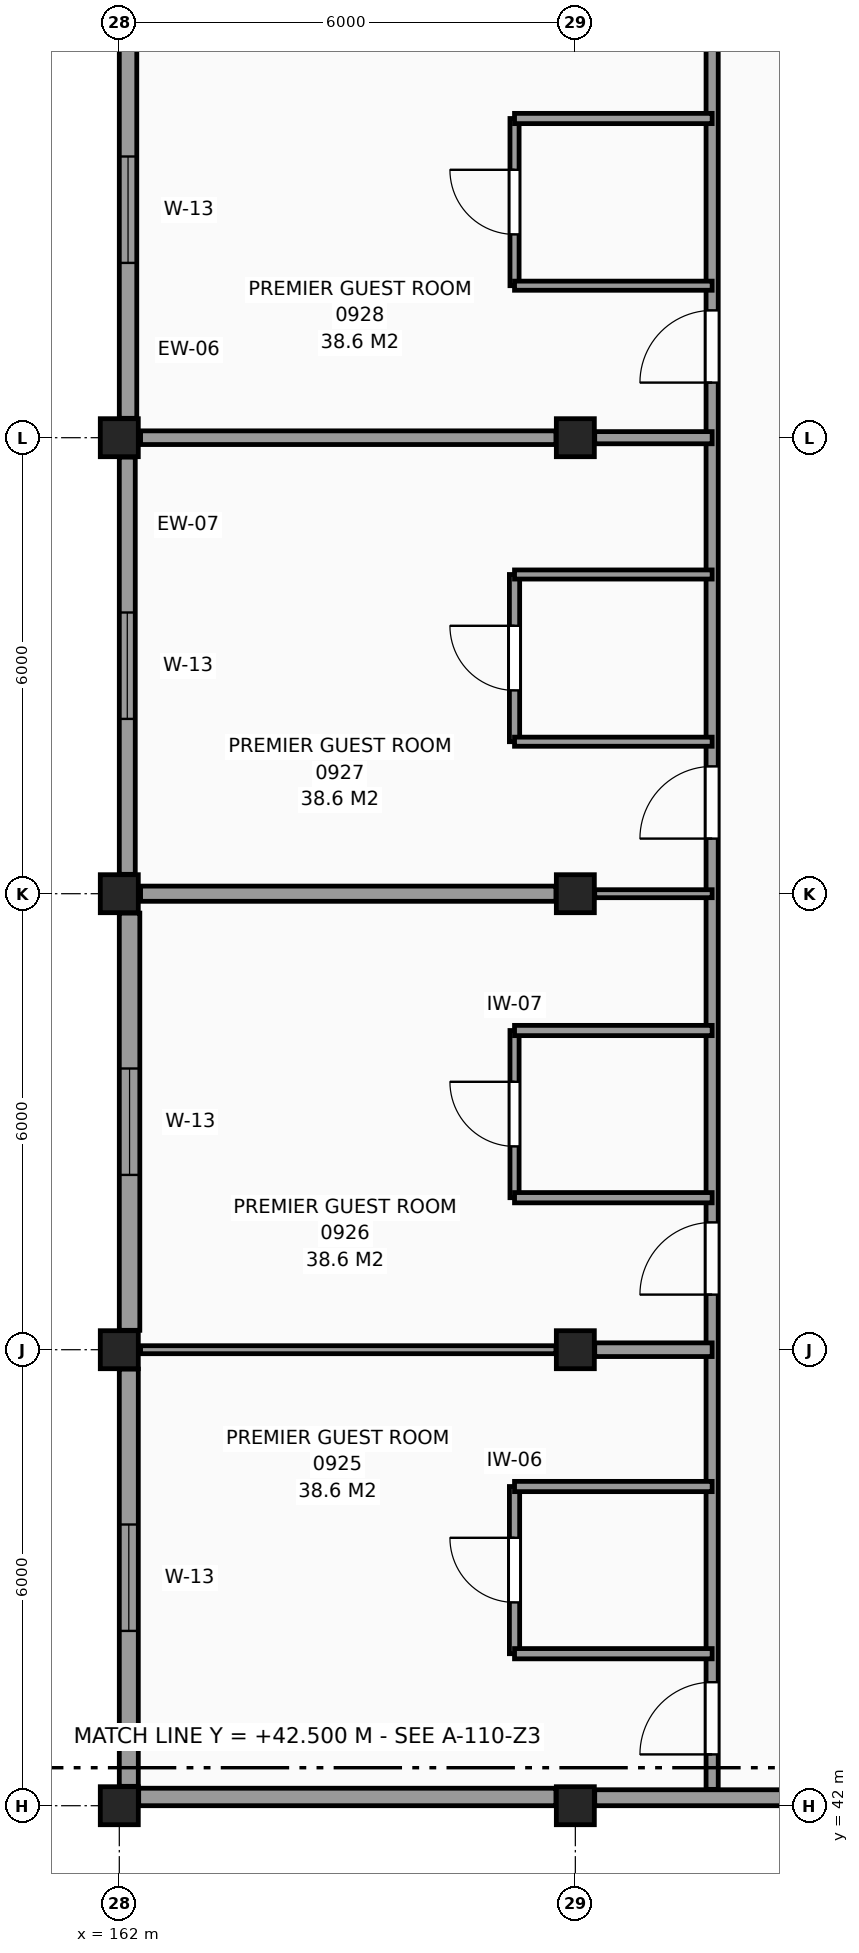
"""IFC4 building model, lengths in metres.
Left out: names, types, materials, properties, quantities, classifications, styles, units other than length and angle.
Written with IfcOpenShell. Run it as: python <this file> out.ifc"""

import sys

from ifc_helpers import new_model, si_unit, direction, frame, frame_2d, origin, origin_2d, place, context, subcontext, project, spatial, rectangle, extrude, element, fill, save


model = new_model("IFC4")
c1 = context("Model", 3, precision=1e-05, world=origin(), true_north=direction((0.0, 1.0)))
c2 = subcontext(c1, "Body", "Model", "MODEL_VIEW")
j1 = project(units=[si_unit("LENGTHUNIT", "METRE"), si_unit("PLANEANGLEUNIT", "RADIAN")], contexts=[c1])
p1 = place(None, origin())
s1 = spatial("IfcSite", under=j1, at=p1, CompositionType="ELEMENT")
p2 = place(p1, origin())
s2 = spatial("IfcBuilding", under=s1, at=p2, CompositionType="ELEMENT")
p3 = place(p2, frame((0.0, 0.0, 38.1)))
s3 = spatial("IfcBuildingStorey", under=s2, at=p3, CompositionType="ELEMENT", Elevation=38.1)
for number, where, z_axis, x_axis in (
    (1, (162.0, 42.0, 0.0), (0.0, 0.0, 1.0), (1.0, 0.0, 0.0)),
    (2, (162.0, 48.0, 0.0), (0.0, 0.0, 1.0), (1.0, 0.0, 0.0)),
    (3, (162.0, 54.0, 0.0), (0.0, 0.0, 1.0), (1.0, 0.0, 0.0)),
    (4, (162.0, 60.0, 0.0), (0.0, 0.0, 1.0), (1.0, 0.0, 0.0)),
    (5, (168.0, 42.0, 0.0), (0.0, 0.0, 1.0), (1.0, 0.0, 0.0)),
    (6, (168.0, 48.0, 0.0), (0.0, 0.0, 1.0), (1.0, 0.0, 0.0)),
    (7, (168.0, 54.0, 0.0), (0.0, 0.0, 1.0), (1.0, 0.0, 0.0)),
    (8, (168.0, 60.0, 0.0), (0.0, 0.0, 1.0), (1.0, 0.0, 0.0)),
):
    element("IfcColumn", number, at=place(p3, frame(where, z_axis=z_axis, x_axis=x_axis)), inside=s3, PredefinedType="COLUMN", context=c2, shape_type="SweptSolid", body=[
        extrude(rectangle(XDim=0.5, YDim=0.5, at=origin_2d()), origin(), (0.0, 0.0, 1.0), 3.3),
    ])
p4 = place(p3, frame((162.115, 65.745, 0.0), z_axis=(0.0, 0.0, 1.0), x_axis=(0.0, -1.0, 0.0)))
e9 = element("IfcWall", 9, at=p4, inside=s3, PredefinedType="SOLIDWALL", context=c2, shape_type="SweptSolid", body=[
    extrude(rectangle(XDim=5.49, YDim=0.23, at=frame_2d((2.745, 0.0))), origin(), (0.0, 0.0, 1.0), 2.41),
])
p5 = place(p4, frame((2.045, 0.0, 0.8)))
e10 = element("IfcOpeningElement", 10, at=p5, cuts=e9, PredefinedType="OPENING", context=c2, shape_type="SweptSolid", body=[
    extrude(rectangle(XDim=1.4, YDim=1.4, at=frame_2d((0.7, 0.7))), frame((0.0, 0.125, 0.0), z_axis=(0.0, -1.0, 0.0), x_axis=(1.0, 0.0, 0.0)), (0.0, 0.0, 1.0), 0.25),
])
p6 = place(p3, frame((162.105, 59.745, 0.0), z_axis=(0.0, 0.0, 1.0), x_axis=(0.0, -1.0, 0.0)))
e11 = element("IfcWall", 11, at=p6, inside=s3, PredefinedType="SOLIDWALL", context=c2, shape_type="SweptSolid", body=[
    extrude(rectangle(XDim=5.49, YDim=0.21, at=frame_2d((2.745, 0.0))), origin(), (0.0, 0.0, 1.0), 2.41),
])
p7 = place(p6, frame((2.045, 0.0, 0.8)))
e12 = element("IfcOpeningElement", 12, at=p7, cuts=e11, PredefinedType="OPENING", context=c2, shape_type="SweptSolid", body=[
    extrude(rectangle(XDim=1.4, YDim=1.4, at=frame_2d((0.7, 0.7))), frame((0.0, 0.115, 0.0), z_axis=(0.0, -1.0, 0.0), x_axis=(1.0, 0.0, 0.0)), (0.0, 0.0, 1.0), 0.23),
])
p8 = place(p3, frame((162.135, 53.745, 0.0), z_axis=(0.0, 0.0, 1.0), x_axis=(0.0, -1.0, 0.0)))
e13 = element("IfcWall", 13, at=p8, inside=s3, PredefinedType="SOLIDWALL", context=c2, shape_type="SweptSolid", body=[
    extrude(rectangle(XDim=5.49, YDim=0.27, at=frame_2d((2.745, 0.0))), origin(), (0.0, 0.0, 1.0), 2.41),
])
p9 = place(p8, frame((2.045, 0.0, 0.8)))
e14 = element("IfcOpeningElement", 14, at=p9, cuts=e13, PredefinedType="OPENING", context=c2, shape_type="SweptSolid", body=[
    extrude(rectangle(XDim=1.4, YDim=1.4, at=frame_2d((0.7, 0.7))), frame((0.0, 0.145, 0.0), z_axis=(0.0, -1.0, 0.0), x_axis=(1.0, 0.0, 0.0)), (0.0, 0.0, 1.0), 0.29),
])
p10 = place(p3, frame((162.125, 47.745, 0.0), z_axis=(0.0, 0.0, 1.0), x_axis=(0.0, -1.0, 0.0)))
e15 = element("IfcWall", 15, at=p10, inside=s3, PredefinedType="SOLIDWALL", context=c2, shape_type="SweptSolid", body=[
    extrude(rectangle(XDim=5.49, YDim=0.25, at=frame_2d((2.745, 0.0))), origin(), (0.0, 0.0, 1.0), 2.41),
])
p11 = place(p10, frame((2.045, 0.0, 0.8)))
e16 = element("IfcOpeningElement", 16, at=p11, cuts=e15, PredefinedType="OPENING", context=c2, shape_type="SweptSolid", body=[
    extrude(rectangle(XDim=1.4, YDim=1.4, at=frame_2d((0.7, 0.7))), frame((0.0, 0.135, 0.0), z_axis=(0.0, -1.0, 0.0), x_axis=(1.0, 0.0, 0.0)), (0.0, 0.0, 1.0), 0.27),
])
p12 = place(p3, frame((162.255, 42.115, 0.0), z_axis=(0.0, 0.0, 1.0), x_axis=(1.0, 0.0, 0.0)))
e17 = element("IfcWall", 17, at=p12, inside=s3, PredefinedType="SOLIDWALL", context=c2, shape_type="SweptSolid", body=[
    extrude(rectangle(XDim=5.49, YDim=0.23, at=frame_2d((2.745, 0.0))), origin(), (0.0, 0.0, 1.0), 2.26),
])
p13 = place(p3, frame((168.255, 42.105, 0.0), z_axis=(0.0, 0.0, 1.0), x_axis=(1.0, 0.0, 0.0)))
e18 = element("IfcWall", 18, at=p13, inside=s3, PredefinedType="SOLIDWALL", context=c2, shape_type="SweptSolid", body=[
    extrude(rectangle(XDim=5.49, YDim=0.21, at=frame_2d((2.745, 0.0))), origin(), (0.0, 0.0, 1.0), 2.26),
])
p14 = place(p3, frame((167.2, 44.0, 0.0), z_axis=(0.0, 0.0, 1.0), x_axis=(0.0, 1.0, 0.0)))
e19 = element("IfcWall", 19, at=p14, inside=s3, PredefinedType="PARTITIONING", context=c2, shape_type="SweptSolid", body=[
    extrude(rectangle(XDim=2.2, YDim=0.135, at=frame_2d((1.1, 0.0))), origin(), (0.0, 0.0, 1.0), 3.06),
])
p15 = place(p14, frame((0.675, 0.0, 0.0)))
e20 = element("IfcOpeningElement", 20, at=p15, cuts=e19, PredefinedType="OPENING", context=c2, shape_type="SweptSolid", body=[
    extrude(rectangle(XDim=0.85, YDim=2.1, at=frame_2d((0.425, 1.05))), frame((0.0, 0.078, 0.0), z_axis=(0.0, -1.0, 0.0), x_axis=(1.0, 0.0, 0.0)), (0.0, 0.0, 1.0), 0.155),
])
p16 = place(p3, frame((167.2, 50.0, 0.0), z_axis=(0.0, 0.0, 1.0), x_axis=(0.0, 1.0, 0.0)))
e21 = element("IfcWall", 21, at=p16, inside=s3, PredefinedType="PARTITIONING", context=c2, shape_type="SweptSolid", body=[
    extrude(rectangle(XDim=2.2, YDim=0.12, at=frame_2d((1.1, 0.0))), origin(), (0.0, 0.0, 1.0), 3.06),
])
p17 = place(p16, frame((0.675, 0.0, 0.0)))
e22 = element("IfcOpeningElement", 22, at=p17, cuts=e21, PredefinedType="OPENING", context=c2, shape_type="SweptSolid", body=[
    extrude(rectangle(XDim=0.85, YDim=2.1, at=frame_2d((0.425, 1.05))), frame((0.0, 0.07, 0.0), z_axis=(0.0, -1.0, 0.0), x_axis=(1.0, 0.0, 0.0)), (0.0, 0.0, 1.0), 0.14),
])
p18 = place(p3, frame((167.2, 56.0, 0.0), z_axis=(0.0, 0.0, 1.0), x_axis=(0.0, 1.0, 0.0)))
e23 = element("IfcWall", 23, at=p18, inside=s3, PredefinedType="PARTITIONING", context=c2, shape_type="SweptSolid", body=[
    extrude(rectangle(XDim=2.2, YDim=0.135, at=frame_2d((1.1, 0.0))), origin(), (0.0, 0.0, 1.0), 3.06),
])
p19 = place(p18, frame((0.675, 0.0, 0.0)))
e24 = element("IfcOpeningElement", 24, at=p19, cuts=e23, PredefinedType="OPENING", context=c2, shape_type="SweptSolid", body=[
    extrude(rectangle(XDim=0.85, YDim=2.1, at=frame_2d((0.425, 1.05))), frame((0.0, 0.078, 0.0), z_axis=(0.0, -1.0, 0.0), x_axis=(1.0, 0.0, 0.0)), (0.0, 0.0, 1.0), 0.155),
])
p20 = place(p3, frame((167.2, 62.0, 0.0), z_axis=(0.0, 0.0, 1.0), x_axis=(0.0, 1.0, 0.0)))
e25 = element("IfcWall", 25, at=p20, inside=s3, PredefinedType="PARTITIONING", context=c2, shape_type="SweptSolid", body=[
    extrude(rectangle(XDim=2.2, YDim=0.12, at=frame_2d((1.1, 0.0))), origin(), (0.0, 0.0, 1.0), 3.06),
])
p21 = place(p20, frame((0.675, 0.0, 0.0)))
e26 = element("IfcOpeningElement", 26, at=p21, cuts=e25, PredefinedType="OPENING", context=c2, shape_type="SweptSolid", body=[
    extrude(rectangle(XDim=0.85, YDim=2.1, at=frame_2d((0.425, 1.05))), frame((0.0, 0.07, 0.0), z_axis=(0.0, -1.0, 0.0), x_axis=(1.0, 0.0, 0.0)), (0.0, 0.0, 1.0), 0.14),
])
p22 = place(p3, frame((169.8, 42.215, 0.0), z_axis=(0.0, 0.0, 1.0), x_axis=(0.0, 1.0, 0.0)))
e27 = element("IfcWall", 27, at=p22, inside=s3, PredefinedType="PARTITIONING", context=c2, shape_type="SweptSolid", body=[
    extrude(rectangle(XDim=65.605, YDim=0.16, at=frame_2d((32.802, 0.0))), origin(), (0.0, 0.0, 1.0), 3.06),
])
p23 = place(p22, frame((50.185, 0.0, 0.0)))
e28 = element("IfcOpeningElement", 28, at=p23, cuts=e27, PredefinedType="OPENING", context=c2, shape_type="SweptSolid", body=[
    extrude(rectangle(XDim=1.2, YDim=2.2, at=frame_2d((0.6, 1.1))), frame((0.0, 0.09, 0.0), z_axis=(0.0, -1.0, 0.0), x_axis=(1.0, 0.0, 0.0)), (0.0, 0.0, 1.0), 0.18),
])
p24 = place(p22, frame((32.285, 0.0, 0.0)))
e29 = element("IfcOpeningElement", 29, at=p24, cuts=e27, PredefinedType="OPENING", context=c2, shape_type="SweptSolid", body=[
    extrude(rectangle(XDim=1.0, YDim=2.15, at=frame_2d((0.5, 1.075))), frame((0.0, 0.09, 0.0), z_axis=(0.0, -1.0, 0.0), x_axis=(1.0, 0.0, 0.0)), (0.0, 0.0, 1.0), 0.18),
])
p25 = place(p22, frame((0.46, 0.0, 0.0)))
e30 = element("IfcOpeningElement", 30, at=p25, cuts=e27, PredefinedType="OPENING", context=c2, shape_type="SweptSolid", body=[
    extrude(rectangle(XDim=0.95, YDim=2.1, at=frame_2d((0.475, 1.05))), frame((0.0, 0.09, 0.0), z_axis=(0.0, -1.0, 0.0), x_axis=(1.0, 0.0, 0.0)), (0.0, 0.0, 1.0), 0.18),
])
p26 = place(p22, frame((6.51, 0.0, 0.0)))
e31 = element("IfcOpeningElement", 31, at=p26, cuts=e27, PredefinedType="OPENING", context=c2, shape_type="SweptSolid", body=[
    extrude(rectangle(XDim=0.95, YDim=2.1, at=frame_2d((0.475, 1.05))), frame((0.0, 0.09, 0.0), z_axis=(0.0, -1.0, 0.0), x_axis=(1.0, 0.0, 0.0)), (0.0, 0.0, 1.0), 0.18),
])
p27 = place(p22, frame((12.51, 0.0, 0.0)))
e32 = element("IfcOpeningElement", 32, at=p27, cuts=e27, PredefinedType="OPENING", context=c2, shape_type="SweptSolid", body=[
    extrude(rectangle(XDim=0.95, YDim=2.1, at=frame_2d((0.475, 1.05))), frame((0.0, 0.09, 0.0), z_axis=(0.0, -1.0, 0.0), x_axis=(1.0, 0.0, 0.0)), (0.0, 0.0, 1.0), 0.18),
])
p28 = place(p22, frame((18.51, 0.0, 0.0)))
e33 = element("IfcOpeningElement", 33, at=p28, cuts=e27, PredefinedType="OPENING", context=c2, shape_type="SweptSolid", body=[
    extrude(rectangle(XDim=0.95, YDim=2.1, at=frame_2d((0.475, 1.05))), frame((0.0, 0.09, 0.0), z_axis=(0.0, -1.0, 0.0), x_axis=(1.0, 0.0, 0.0)), (0.0, 0.0, 1.0), 0.18),
])
p29 = place(p22, frame((24.51, 0.0, 0.0)))
e34 = element("IfcOpeningElement", 34, at=p29, cuts=e27, PredefinedType="OPENING", context=c2, shape_type="SweptSolid", body=[
    extrude(rectangle(XDim=0.95, YDim=2.1, at=frame_2d((0.475, 1.05))), frame((0.0, 0.09, 0.0), z_axis=(0.0, -1.0, 0.0), x_axis=(1.0, 0.0, 0.0)), (0.0, 0.0, 1.0), 0.18),
])
p30 = place(p22, frame((54.51, 0.0, 0.0)))
e35 = element("IfcOpeningElement", 35, at=p30, cuts=e27, PredefinedType="OPENING", context=c2, shape_type="SweptSolid", body=[
    extrude(rectangle(XDim=0.95, YDim=2.1, at=frame_2d((0.475, 1.05))), frame((0.0, 0.09, 0.0), z_axis=(0.0, -1.0, 0.0), x_axis=(1.0, 0.0, 0.0)), (0.0, 0.0, 1.0), 0.18),
])
p31 = place(p22, frame((60.51, 0.0, 0.0)))
e36 = element("IfcOpeningElement", 36, at=p31, cuts=e27, PredefinedType="OPENING", context=c2, shape_type="SweptSolid", body=[
    extrude(rectangle(XDim=0.95, YDim=2.1, at=frame_2d((0.475, 1.05))), frame((0.0, 0.09, 0.0), z_axis=(0.0, -1.0, 0.0), x_axis=(1.0, 0.0, 0.0)), (0.0, 0.0, 1.0), 0.18),
])
for number, where, z_axis, x_axis in (
    (37, (167.2, 44.0, 0.0), (0.0, 0.0, 1.0), (1.0, 0.0, 0.0)),
    (38, (167.2, 46.2, 0.0), (0.0, 0.0, 1.0), (1.0, 0.0, 0.0)),
):
    element("IfcWall", number, at=place(p3, frame(where, z_axis=z_axis, x_axis=x_axis)), inside=s3, PredefinedType="PARTITIONING", context=c2, shape_type="SweptSolid", body=[
        extrude(rectangle(XDim=2.6, YDim=0.135, at=frame_2d((1.3, 0.0))), origin(), (0.0, 0.0, 1.0), 3.06),
    ])
p32 = place(p3, frame((162.28, 48.0, 0.0), z_axis=(0.0, 0.0, 1.0), x_axis=(1.0, 0.0, 0.0)))
e39 = element("IfcWall", 39, at=p32, inside=s3, PredefinedType="PARTITIONING", context=c2, shape_type="SweptSolid", body=[
    extrude(rectangle(XDim=5.465, YDim=0.105, at=frame_2d((2.732, 0.0))), origin(), (0.0, 0.0, 1.0), 2.46),
])
p33 = place(p3, frame((168.255, 48.0, 0.0), z_axis=(0.0, 0.0, 1.0), x_axis=(1.0, 0.0, 0.0)))
e40 = element("IfcWall", 40, at=p33, inside=s3, PredefinedType="PARTITIONING", context=c2, shape_type="SweptSolid", body=[
    extrude(rectangle(XDim=1.545, YDim=0.18, at=frame_2d((0.772, 0.0))), origin(), (0.0, 0.0, 1.0), 2.61),
])
for number, where, z_axis, x_axis in (
    (41, (167.2, 50.0, 0.0), (0.0, 0.0, 1.0), (1.0, 0.0, 0.0)),
    (42, (167.2, 52.2, 0.0), (0.0, 0.0, 1.0), (1.0, 0.0, 0.0)),
):
    element("IfcWall", number, at=place(p3, frame(where, z_axis=z_axis, x_axis=x_axis)), inside=s3, PredefinedType="PARTITIONING", context=c2, shape_type="SweptSolid", body=[
        extrude(rectangle(XDim=2.6, YDim=0.135, at=frame_2d((1.3, 0.0))), origin(), (0.0, 0.0, 1.0), 3.06),
    ])
p34 = place(p3, frame((162.28, 54.0, 0.0), z_axis=(0.0, 0.0, 1.0), x_axis=(1.0, 0.0, 0.0)))
e43 = element("IfcWall", 43, at=p34, inside=s3, PredefinedType="PARTITIONING", context=c2, shape_type="SweptSolid", body=[
    extrude(rectangle(XDim=5.465, YDim=0.2, at=frame_2d((2.732, 0.0))), origin(), (0.0, 0.0, 1.0), 2.26),
])
p35 = place(p3, frame((168.255, 54.0, 0.0), z_axis=(0.0, 0.0, 1.0), x_axis=(1.0, 0.0, 0.0)))
e44 = element("IfcWall", 44, at=p35, inside=s3, PredefinedType="PARTITIONING", context=c2, shape_type="SweptSolid", body=[
    extrude(rectangle(XDim=1.545, YDim=0.105, at=frame_2d((0.772, 0.0))), origin(), (0.0, 0.0, 1.0), 2.26),
])
for number, where, z_axis, x_axis in (
    (45, (167.2, 56.0, 0.0), (0.0, 0.0, 1.0), (1.0, 0.0, 0.0)),
    (46, (167.2, 58.2, 0.0), (0.0, 0.0, 1.0), (1.0, 0.0, 0.0)),
):
    element("IfcWall", number, at=place(p3, frame(where, z_axis=z_axis, x_axis=x_axis)), inside=s3, PredefinedType="PARTITIONING", context=c2, shape_type="SweptSolid", body=[
        extrude(rectangle(XDim=2.6, YDim=0.12, at=frame_2d((1.3, 0.0))), origin(), (0.0, 0.0, 1.0), 3.06),
    ])
p36 = place(p3, frame((162.28, 60.0, 0.0), z_axis=(0.0, 0.0, 1.0), x_axis=(1.0, 0.0, 0.0)))
e47 = element("IfcWall", 47, at=p36, inside=s3, PredefinedType="PARTITIONING", context=c2, shape_type="SweptSolid", body=[
    extrude(rectangle(XDim=5.465, YDim=0.18, at=frame_2d((2.732, 0.0))), origin(), (0.0, 0.0, 1.0), 2.26),
])
p37 = place(p3, frame((168.255, 60.0, 0.0), z_axis=(0.0, 0.0, 1.0), x_axis=(1.0, 0.0, 0.0)))
e48 = element("IfcWall", 48, at=p37, inside=s3, PredefinedType="PARTITIONING", context=c2, shape_type="SweptSolid", body=[
    extrude(rectangle(XDim=1.545, YDim=0.16, at=frame_2d((0.772, 0.0))), origin(), (0.0, 0.0, 1.0), 2.26),
])
p38 = place(p3, frame((167.2, 62.0, 0.0), z_axis=(0.0, 0.0, 1.0), x_axis=(1.0, 0.0, 0.0)))
e49 = element("IfcWall", 49, at=p38, inside=s3, PredefinedType="PARTITIONING", context=c2, shape_type="SweptSolid", body=[
    extrude(rectangle(XDim=2.6, YDim=0.12, at=frame_2d((1.3, 0.0))), origin(), (0.0, 0.0, 1.0), 3.06),
])
p39 = place(p3, frame((167.2, 64.2, 0.0), z_axis=(0.0, 0.0, 1.0), x_axis=(1.0, 0.0, 0.0)))
e50 = element("IfcWall", 50, at=p39, inside=s3, PredefinedType="PARTITIONING", context=c2, shape_type="SweptSolid", body=[
    extrude(rectangle(XDim=2.6, YDim=0.135, at=frame_2d((1.3, 0.0))), origin(), (0.0, 0.0, 1.0), 3.06),
])
p40 = place(p11, origin())
e51 = element("IfcWindow", 51, at=p40, inside=s3, PartitioningType="SINGLE_PANEL", PredefinedType="WINDOW", context=c2, shape_type="SweptSolid", body=[
    extrude(rectangle(XDim=1.4, YDim=1.4, at=frame_2d((0.7, 0.7))), frame((0.0, 0.03, 0.0), z_axis=(0.0, -1.0, 0.0), x_axis=(1.0, 0.0, 0.0)), (0.0, 0.0, 1.0), 0.06),
])
fill(e16, e51)
p41 = place(p9, origin())
e52 = element("IfcWindow", 52, at=p41, inside=s3, PartitioningType="SINGLE_PANEL", PredefinedType="WINDOW", context=c2, shape_type="SweptSolid", body=[
    extrude(rectangle(XDim=1.4, YDim=1.4, at=frame_2d((0.7, 0.7))), frame((0.0, 0.03, 0.0), z_axis=(0.0, -1.0, 0.0), x_axis=(1.0, 0.0, 0.0)), (0.0, 0.0, 1.0), 0.06),
])
fill(e14, e52)
p42 = place(p7, origin())
e53 = element("IfcWindow", 53, at=p42, inside=s3, PartitioningType="SINGLE_PANEL", PredefinedType="WINDOW", context=c2, shape_type="SweptSolid", body=[
    extrude(rectangle(XDim=1.4, YDim=1.4, at=frame_2d((0.7, 0.7))), frame((0.0, 0.03, 0.0), z_axis=(0.0, -1.0, 0.0), x_axis=(1.0, 0.0, 0.0)), (0.0, 0.0, 1.0), 0.06),
])
fill(e12, e53)
p43 = place(p5, origin())
e54 = element("IfcWindow", 54, at=p43, inside=s3, PartitioningType="SINGLE_PANEL", PredefinedType="WINDOW", context=c2, shape_type="SweptSolid", body=[
    extrude(rectangle(XDim=1.4, YDim=1.4, at=frame_2d((0.7, 0.7))), frame((0.0, 0.03, 0.0), z_axis=(0.0, -1.0, 0.0), x_axis=(1.0, 0.0, 0.0)), (0.0, 0.0, 1.0), 0.06),
])
fill(e10, e54)
p44 = place(p15, origin())
e55 = element("IfcDoor", 55, at=p44, inside=s3, OperationType="SINGLE_SWING_RIGHT", PredefinedType="DOOR", context=c2, shape_type="SweptSolid", body=[
    extrude(rectangle(XDim=0.85, YDim=2.1, at=frame_2d((0.425, 1.05))), frame((0.0, 0.025, 0.0), z_axis=(0.0, -1.0, 0.0), x_axis=(1.0, 0.0, 0.0)), (0.0, 0.0, 1.0), 0.05),
])
fill(e20, e55)
p45 = place(p25, origin())
e56 = element("IfcDoor", 56, at=p45, inside=s3, OperationType="SINGLE_SWING_LEFT", PredefinedType="DOOR", context=c2, shape_type="SweptSolid", body=[
    extrude(rectangle(XDim=0.95, YDim=2.1, at=frame_2d((0.475, 1.05))), frame((0.0, 0.025, 0.0), z_axis=(0.0, -1.0, 0.0), x_axis=(1.0, 0.0, 0.0)), (0.0, 0.0, 1.0), 0.05),
])
fill(e30, e56)
p46 = place(p17, origin())
e57 = element("IfcDoor", 57, at=p46, inside=s3, OperationType="SINGLE_SWING_RIGHT", PredefinedType="DOOR", context=c2, shape_type="SweptSolid", body=[
    extrude(rectangle(XDim=0.85, YDim=2.1, at=frame_2d((0.425, 1.05))), frame((0.0, 0.025, 0.0), z_axis=(0.0, -1.0, 0.0), x_axis=(1.0, 0.0, 0.0)), (0.0, 0.0, 1.0), 0.05),
])
fill(e22, e57)
p47 = place(p26, origin())
e58 = element("IfcDoor", 58, at=p47, inside=s3, OperationType="SINGLE_SWING_LEFT", PredefinedType="DOOR", context=c2, shape_type="SweptSolid", body=[
    extrude(rectangle(XDim=0.95, YDim=2.1, at=frame_2d((0.475, 1.05))), frame((0.0, 0.025, 0.0), z_axis=(0.0, -1.0, 0.0), x_axis=(1.0, 0.0, 0.0)), (0.0, 0.0, 1.0), 0.05),
])
fill(e31, e58)
p48 = place(p19, origin())
e59 = element("IfcDoor", 59, at=p48, inside=s3, OperationType="SINGLE_SWING_RIGHT", PredefinedType="DOOR", context=c2, shape_type="SweptSolid", body=[
    extrude(rectangle(XDim=0.85, YDim=2.1, at=frame_2d((0.425, 1.05))), frame((0.0, 0.025, 0.0), z_axis=(0.0, -1.0, 0.0), x_axis=(1.0, 0.0, 0.0)), (0.0, 0.0, 1.0), 0.05),
])
fill(e24, e59)
p49 = place(p27, origin())
e60 = element("IfcDoor", 60, at=p49, inside=s3, OperationType="SINGLE_SWING_LEFT", PredefinedType="DOOR", context=c2, shape_type="SweptSolid", body=[
    extrude(rectangle(XDim=0.95, YDim=2.1, at=frame_2d((0.475, 1.05))), frame((0.0, 0.025, 0.0), z_axis=(0.0, -1.0, 0.0), x_axis=(1.0, 0.0, 0.0)), (0.0, 0.0, 1.0), 0.05),
])
fill(e32, e60)
p50 = place(p21, origin())
e61 = element("IfcDoor", 61, at=p50, inside=s3, OperationType="SINGLE_SWING_RIGHT", PredefinedType="DOOR", context=c2, shape_type="SweptSolid", body=[
    extrude(rectangle(XDim=0.85, YDim=2.1, at=frame_2d((0.425, 1.05))), frame((0.0, 0.025, 0.0), z_axis=(0.0, -1.0, 0.0), x_axis=(1.0, 0.0, 0.0)), (0.0, 0.0, 1.0), 0.05),
])
fill(e26, e61)
p51 = place(p28, origin())
e62 = element("IfcDoor", 62, at=p51, inside=s3, OperationType="SINGLE_SWING_LEFT", PredefinedType="DOOR", context=c2, shape_type="SweptSolid", body=[
    extrude(rectangle(XDim=0.95, YDim=2.1, at=frame_2d((0.475, 1.05))), frame((0.0, 0.025, 0.0), z_axis=(0.0, -1.0, 0.0), x_axis=(1.0, 0.0, 0.0)), (0.0, 0.0, 1.0), 0.05),
])
fill(e33, e62)
save(model, sys.argv[1])
